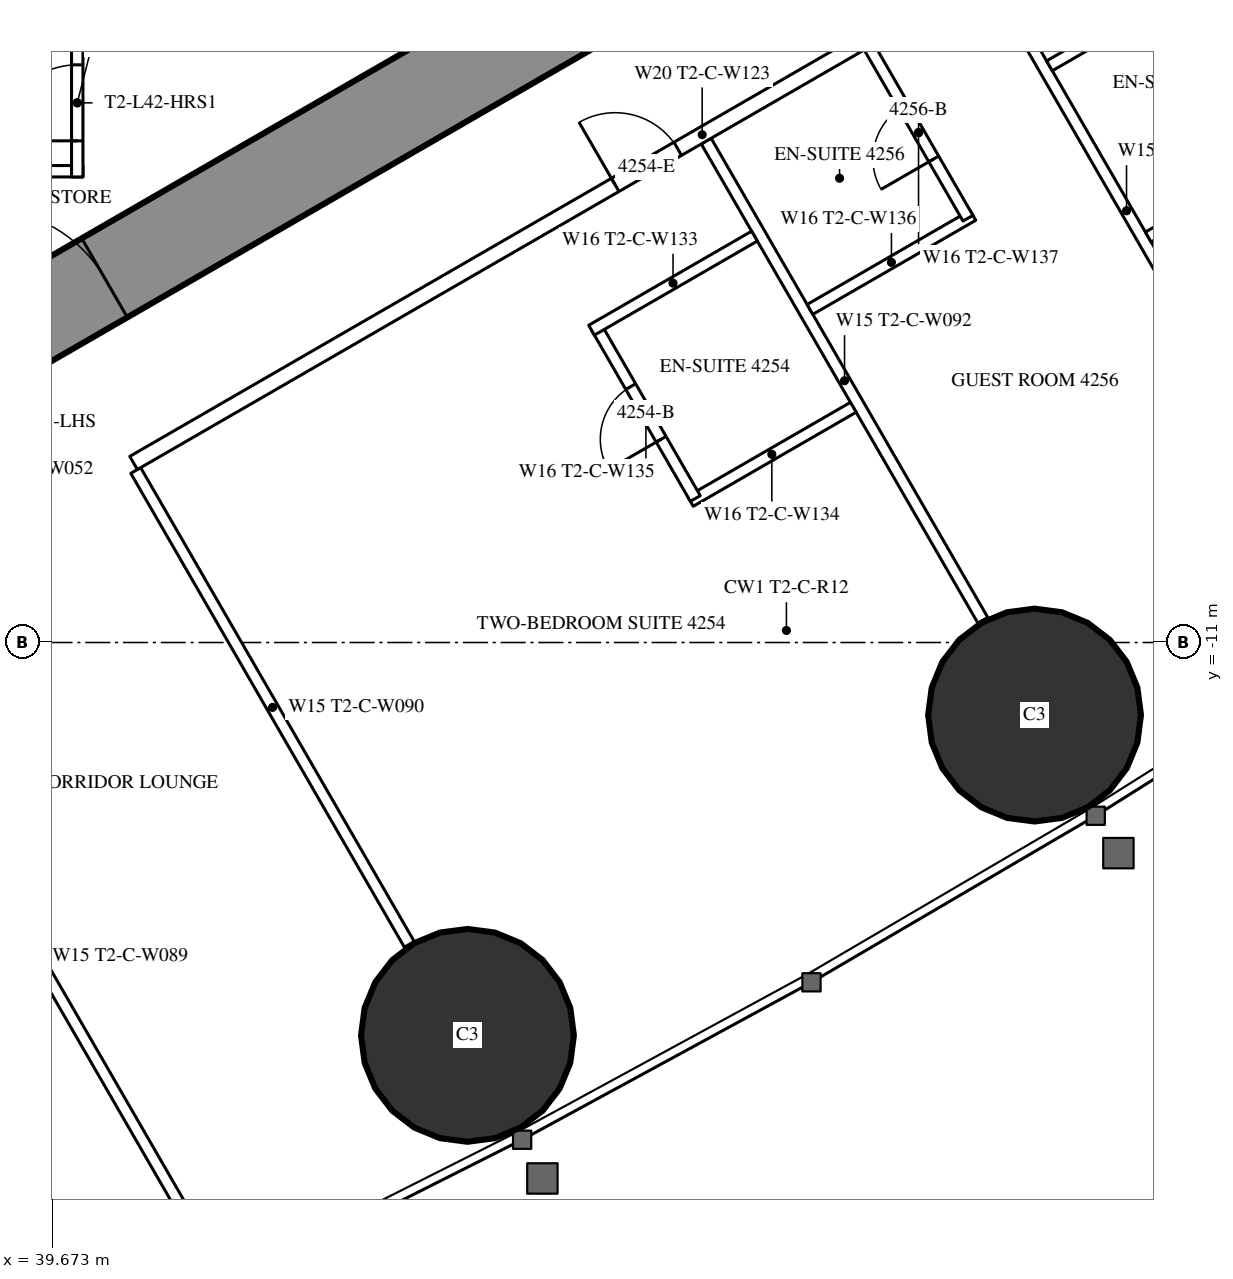
"""IFC4 building model, lengths in metres.
Left out: names, types, materials, properties, quantities, classifications, styles, units other than length and angle.
Written with IfcOpenShell. Run it as: python <this file> out.ifc"""

import sys

from ifc_helpers import new_model, si_unit, direction, frame, frame_2d, origin, origin_2d, place, context, subcontext, project, spatial, rectangle, circle, extrude, element, fill, save


model = new_model("IFC4")
c1 = context("Model", 3, precision=1e-05, world=origin(), true_north=direction((0.0, 1.0)))
c2 = subcontext(c1, "Body", "Model", "MODEL_VIEW")
j1 = project(units=[si_unit("LENGTHUNIT", "METRE"), si_unit("PLANEANGLEUNIT", "RADIAN")], contexts=[c1])
p1 = place(None, origin())
s1 = spatial("IfcSite", under=j1, at=p1, CompositionType="ELEMENT")
p2 = place(p1, origin())
s2 = spatial("IfcBuilding", under=s1, at=p2, CompositionType="ELEMENT")
p3 = place(p2, frame((0.0, 0.0, 159.8)))
s3 = spatial("IfcBuildingStorey", under=s2, at=p3, CompositionType="ELEMENT", Elevation=159.8)
for number, where, z_axis, x_axis in (
    (1, (45.134, -16.168, 0.0), (0.0, 0.0, 1.0), (1.0, 0.0, 0.0)),
    (2, (52.594, -11.955, 0.0), (0.0, 0.0, 1.0), (1.0, 0.0, 0.0)),
):
    element("IfcColumn", number, at=place(p3, frame(where, z_axis=z_axis, x_axis=x_axis)), inside=s3, PredefinedType="COLUMN", context=c2, shape_type="SweptSolid", body=[
        extrude(circle(Radius=1.4, at=origin_2d()), origin(), (0.0, 0.0, 1.0), 3.5),
    ])
p4 = place(p3, frame((27.2, -13.8, 0.0), z_axis=(0.0, 0.0, 1.0), x_axis=(0.866027159892, 0.499996958321, 0.0)))
e3 = element("IfcWall", 3, at=p4, inside=s3, PredefinedType="SHEAR", context=c2, shape_type="SweptSolid", body=[
    extrude(rectangle(XDim=27.947, YDim=1.2, at=frame_2d((13.973, 0.0))), origin(), (0.0, 0.0, 1.0), 3.5),
])
p5 = place(p4, frame((4.6, 0.0, 0.0)))
e4 = element("IfcOpeningElement", 4, at=p5, cuts=e3, PredefinedType="OPENING", context=c2, shape_type="SweptSolid", body=[
    extrude(rectangle(XDim=1.0, YDim=2.2, at=frame_2d((0.5, 1.1))), frame((0.0, 0.61, 0.0), z_axis=(0.0, -1.0, 0.0), x_axis=(1.0, 0.0, 0.0)), (0.0, 0.0, 1.0), 1.22),
])
p6 = place(p4, frame((13.395, 0.0, 0.0)))
e5 = element("IfcOpeningElement", 5, at=p6, cuts=e3, PredefinedType="OPENING", context=c2, shape_type="SweptSolid", body=[
    extrude(rectangle(XDim=1.8, YDim=2.2, at=frame_2d((0.9, 1.1))), frame((0.0, 0.61, 0.0), z_axis=(0.0, -1.0, 0.0), x_axis=(1.0, 0.0, 0.0)), (0.0, 0.0, 1.0), 1.22),
])
p7 = place(p3, frame((37.022, -10.9, 0.0), z_axis=(0.0, 0.0, 1.0), x_axis=(0.499998620953, -0.866026199976, 0.0)))
e6 = element("IfcWall", 6, at=p7, inside=s3, PredefinedType="PARTITIONING", context=c2, shape_type="SweptSolid", body=[
    extrude(rectangle(XDim=9.77, YDim=0.15, at=frame_2d((4.885, 0.0))), origin(), (0.0, 0.0, 1.0), 3.25),
])
p8 = place(p3, frame((40.769, -8.737, 0.0), z_axis=(0.0, 0.0, 1.0), x_axis=(0.500013115284, -0.866017831539, 0.0)))
e7 = element("IfcWall", 7, at=p8, inside=s3, PredefinedType="PARTITIONING", context=c2, shape_type="SweptSolid", body=[
    extrude(rectangle(XDim=7.198, YDim=0.15, at=frame_2d((3.599, 0.0))), origin(), (0.0, 0.0, 1.0), 2.3),
])
p9 = place(p3, frame((48.275, -4.404, 0.0), z_axis=(0.0, 0.0, 1.0), x_axis=(0.500006004368, -0.866021937133, 0.0)))
e8 = element("IfcWall", 8, at=p9, inside=s3, PredefinedType="PARTITIONING", context=c2, shape_type="SweptSolid", body=[
    extrude(rectangle(XDim=7.279, YDim=0.15, at=frame_2d((3.64, 0.0))), origin(), (0.0, 0.0, 1.0), 2.3),
])
p10 = place(p3, frame((52.025, -2.238, 0.0), z_axis=(0.0, 0.0, 1.0), x_axis=(0.499983785035, -0.866034765296, 0.0)))
e9 = element("IfcWall", 9, at=p10, inside=s3, PredefinedType="PARTITIONING", context=c2, shape_type="SweptSolid", body=[
    extrude(rectangle(XDim=7.116, YDim=0.15, at=frame_2d((3.558, 0.0))), origin(), (0.0, 0.0, 1.0), 2.3),
])
p11 = place(p3, frame((40.741, -8.638, 0.0), z_axis=(0.0, 0.0, 1.0), x_axis=(0.866022967338, 0.500004220025, 0.0)))
e10 = element("IfcWall", 10, at=p11, inside=s3, PredefinedType="PARTITIONING", context=c2, shape_type="SweptSolid", body=[
    extrude(rectangle(XDim=17.276, YDim=0.2, at=frame_2d((8.638, 0.0))), origin(), (0.0, 0.0, 1.0), 3.25),
])
p12 = place(p11, frame((7.316, 0.0, 0.0)))
e11 = element("IfcOpeningElement", 11, at=p12, cuts=e10, PredefinedType="OPENING", context=c2, shape_type="SweptSolid", body=[
    extrude(rectangle(XDim=0.95, YDim=2.2, at=frame_2d((0.475, 1.1))), frame((0.0, 0.11, 0.0), z_axis=(0.0, -1.0, 0.0), x_axis=(1.0, 0.0, 0.0)), (0.0, 0.0, 1.0), 0.22),
])
p13 = place(p11, frame((11.366, 0.0, 0.0)))
e12 = element("IfcOpeningElement", 12, at=p13, cuts=e10, PredefinedType="OPENING", context=c2, shape_type="SweptSolid", body=[
    extrude(rectangle(XDim=0.95, YDim=2.2, at=frame_2d((0.475, 1.1))), frame((0.0, 0.11, 0.0), z_axis=(0.0, -1.0, 0.0), x_axis=(1.0, 0.0, 0.0)), (0.0, 0.0, 1.0), 0.22),
])
p14 = place(p11, frame((13.347, 0.0, 0.0)))
e13 = element("IfcOpeningElement", 13, at=p14, cuts=e10, PredefinedType="OPENING", context=c2, shape_type="SweptSolid", body=[
    extrude(rectangle(XDim=0.95, YDim=2.2, at=frame_2d((0.475, 1.1))), frame((0.0, 0.11, 0.0), z_axis=(0.0, -1.0, 0.0), x_axis=(1.0, 0.0, 0.0)), (0.0, 0.0, 1.0), 0.22),
])
p15 = place(p3, frame((48.066, -9.143, 0.0), z_axis=(0.0, 0.0, 1.0), x_axis=(0.866006523861, 0.500032699561, 0.0)))
e14 = element("IfcWall", 14, at=p15, inside=s3, PredefinedType="PARTITIONING", context=c2, shape_type="SweptSolid", body=[
    extrude(rectangle(XDim=2.475, YDim=0.15, at=frame_2d((1.237, 0.0))), origin(), (0.0, 0.0, 1.0), 3.25),
])
p16 = place(p3, frame((46.831, -6.854, 0.0), z_axis=(0.0, 0.0, 1.0), x_axis=(0.500006934395, -0.866021400173, 0.0)))
e15 = element("IfcWall", 15, at=p16, inside=s3, PredefinedType="PARTITIONING", context=c2, shape_type="SweptSolid", body=[
    extrude(rectangle(XDim=2.6, YDim=0.15, at=frame_2d((1.3, 0.0))), origin(), (0.0, 0.0, 1.0), 3.25),
])
p17 = place(p16, frame((0.9, 0.0, 0.0)))
e16 = element("IfcOpeningElement", 16, at=p17, cuts=e15, PredefinedType="OPENING", context=c2, shape_type="SweptSolid", body=[
    extrude(rectangle(XDim=0.8, YDim=2.2, at=frame_2d((0.4, 1.1))), frame((0.0, 0.085, 0.0), z_axis=(0.0, -1.0, 0.0), x_axis=(1.0, 0.0, 0.0)), (0.0, 0.0, 1.0), 0.17),
])
for number, where, z_axis, x_axis in (
    (17, (46.766, -6.891, 0.0), (0.0, 0.0, 1.0), (0.866, 0.5, 0.0)),
    (18, (49.64, -6.618, 0.0), (0.0, 0.0, 1.0), (0.866, 0.5, 0.0)),
):
    element("IfcWall", number, at=place(p3, frame(where, z_axis=z_axis, x_axis=x_axis)), inside=s3, PredefinedType="PARTITIONING", context=c2, shape_type="SweptSolid", body=[
        extrude(rectangle(XDim=2.475, YDim=0.15, at=frame_2d((1.237, 0.0))), origin(), (0.0, 0.0, 1.0), 3.25),
    ])
p18 = place(p3, frame((50.418, -3.166, 0.0), z_axis=(0.0, 0.0, 1.0), x_axis=(0.499936506574, -0.866062058628, 0.0)))
e19 = element("IfcWall", 19, at=p18, inside=s3, PredefinedType="PARTITIONING", context=c2, shape_type="SweptSolid", body=[
    extrude(rectangle(XDim=2.6, YDim=0.15, at=frame_2d((1.3, 0.0))), origin(), (0.0, 0.0, 1.0), 3.25),
])
p19 = place(p18, frame((0.9, 0.0, 0.0)))
e20 = element("IfcOpeningElement", 20, at=p19, cuts=e19, PredefinedType="OPENING", context=c2, shape_type="SweptSolid", body=[
    extrude(rectangle(XDim=0.8, YDim=2.2, at=frame_2d((0.4, 1.1))), frame((0.0, 0.085, 0.0), z_axis=(0.0, -1.0, 0.0), x_axis=(1.0, 0.0, 0.0)), (0.0, 0.0, 1.0), 0.17),
])
for number, where, z_axis, x_axis in (
    (21, (54.09, -5.665, 0.0), (0.0, 0.0, 1.0), (0.866, 0.5, 0.0)),
    (22, (52.79, -3.413, 0.0), (0.0, 0.0, 1.0), (0.866, 0.5, 0.0)),
):
    element("IfcWall", number, at=place(p3, frame(where, z_axis=z_axis, x_axis=x_axis)), inside=s3, PredefinedType="PARTITIONING", context=c2, shape_type="SweptSolid", body=[
        extrude(rectangle(XDim=2.475, YDim=0.15, at=frame_2d((1.237, 0.0))), origin(), (0.0, 0.0, 1.0), 3.25),
    ])
p20 = place(p3, frame((37.9, -4.8, 0.0), z_axis=(0.0, 0.0, 1.0), x_axis=(1.0, 0.0, 0.0)))
e23 = element("IfcWall", 23, at=p20, inside=s3, PredefinedType="PARTITIONING", context=c2, shape_type="SweptSolid", body=[
    extrude(rectangle(XDim=2.175, YDim=0.15, at=frame_2d((1.087, 0.0))), origin(), (0.0, 0.0, 1.0), 3.25),
])
p21 = place(p3, frame((40.0, -4.875, 0.0), z_axis=(0.0, 0.0, 1.0), x_axis=(0.0, 1.0, 0.0)))
e24 = element("IfcWall", 24, at=p21, inside=s3, PredefinedType="PARTITIONING", context=c2, shape_type="SweptSolid", body=[
    extrude(rectangle(XDim=1.95, YDim=0.15, at=frame_2d((0.975, 0.0))), origin(), (0.0, 0.0, 1.0), 3.25),
])
p22 = place(p21, frame((0.475, 0.0, 0.0)))
e25 = element("IfcOpeningElement", 25, at=p22, cuts=e24, PredefinedType="OPENING", context=c2, shape_type="SweptSolid", body=[
    extrude(rectangle(XDim=1.0, YDim=2.2, at=frame_2d((0.5, 1.1))), frame((0.0, 0.085, 0.0), z_axis=(0.0, -1.0, 0.0), x_axis=(1.0, 0.0, 0.0)), (0.0, 0.0, 1.0), 0.17),
])
p23 = place(p17, origin())
e26 = element("IfcDoor", 26, at=p23, inside=s3, OperationType="SINGLE_SWING_RIGHT", PredefinedType="DOOR", context=c2, shape_type="SweptSolid", body=[
    extrude(rectangle(XDim=0.8, YDim=2.2, at=frame_2d((0.4, 1.1))), frame((0.0, 0.025, 0.0), z_axis=(0.0, -1.0, 0.0), x_axis=(1.0, 0.0, 0.0)), (0.0, 0.0, 1.0), 0.05),
])
fill(e16, e26)
p24 = place(p12, origin())
e27 = element("IfcDoor", 27, at=p24, inside=s3, OperationType="SINGLE_SWING_LEFT", PredefinedType="DOOR", context=c2, shape_type="SweptSolid", body=[
    extrude(rectangle(XDim=0.95, YDim=2.2, at=frame_2d((0.475, 1.1))), frame((0.0, 0.025, 0.0), z_axis=(0.0, -1.0, 0.0), x_axis=(1.0, 0.0, 0.0)), (0.0, 0.0, 1.0), 0.05),
])
fill(e11, e27)
p25 = place(p19, origin())
e28 = element("IfcDoor", 28, at=p25, inside=s3, OperationType="SINGLE_SWING_RIGHT", PredefinedType="DOOR", context=c2, shape_type="SweptSolid", body=[
    extrude(rectangle(XDim=0.8, YDim=2.2, at=frame_2d((0.4, 1.1))), frame((0.0, 0.025, 0.0), z_axis=(0.0, -1.0, 0.0), x_axis=(1.0, 0.0, 0.0)), (0.0, 0.0, 1.0), 0.05),
])
fill(e20, e28)
p26 = place(p22, origin())
e29 = element("IfcDoor", 29, at=p26, inside=s3, OperationType="SINGLE_SWING_LEFT", PredefinedType="DOOR", context=c2, shape_type="SweptSolid", body=[
    extrude(rectangle(XDim=1.0, YDim=2.2, at=frame_2d((0.5, 1.1))), frame((0.0, 0.025, 0.0), z_axis=(0.0, -1.0, 0.0), x_axis=(1.0, 0.0, 0.0)), (0.0, 0.0, 1.0), 0.05),
])
fill(e25, e29)
p27 = place(p6, origin())
e30 = element("IfcDoor", 30, at=p27, inside=s3, OperationType="DOUBLE_DOOR_SINGLE_SWING", PredefinedType="DOOR", context=c2, shape_type="SweptSolid", body=[
    extrude(rectangle(XDim=1.8, YDim=2.2, at=frame_2d((0.9, 1.1))), frame((0.0, 0.025, 0.0), z_axis=(0.0, -1.0, 0.0), x_axis=(1.0, 0.0, 0.0)), (0.0, 0.0, 1.0), 0.05),
])
fill(e5, e30)
save(model, sys.argv[1])
